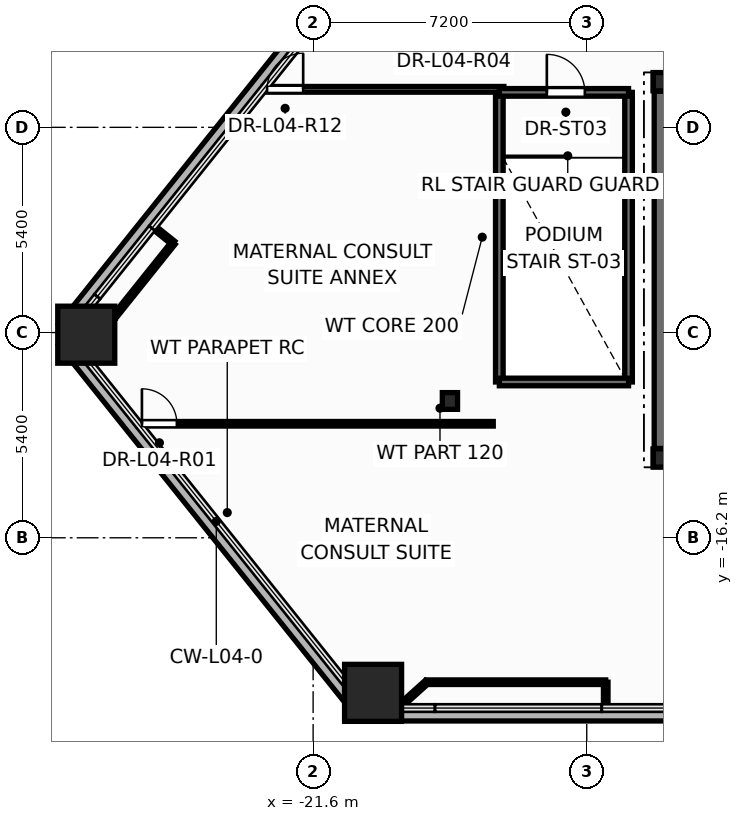
"""IFC4 building model, lengths in metres.
Left out: names, types, materials, properties, quantities, classifications, styles, units other than length and angle.
Written with IfcOpenShell. Run it as: python <this file> out.ifc"""

import sys

from ifc_helpers import new_model, si_unit, direction, frame, frame_2d, origin, origin_2d, place, context, subcontext, project, spatial, rectangle, hollow_rectangle, i_section, extrude, element, fill, save


model = new_model("IFC4")
c1 = context("Model", 3, precision=1e-05, world=origin(), true_north=direction((0.0, 1.0)))
c2 = subcontext(c1, "Body", "Model", "MODEL_VIEW")
j1 = project(units=[si_unit("LENGTHUNIT", "METRE"), si_unit("PLANEANGLEUNIT", "RADIAN")], contexts=[c1])
p1 = place(None, origin())
s1 = spatial("IfcSite", under=j1, at=p1, CompositionType="ELEMENT")
p2 = place(p1, origin())
s2 = spatial("IfcBuilding", under=s1, at=p2, CompositionType="ELEMENT")
p3 = place(p2, frame((0.0, 0.0, 18.9)))
s3 = spatial("IfcBuildingStorey", under=s2, at=p3, CompositionType="ELEMENT", Elevation=18.9)
for number, where, z_axis, x_axis in (
    (1, (-27.57, -10.856, 0.0), (0.0, 0.0, 1.0), (1.0, 0.0, 0.0)),
    (2, (-20.022, -20.28, 0.0), (0.0, 0.0, 1.0), (1.0, 0.0, 0.0)),
):
    element("IfcColumn", number, at=place(p3, frame(where, z_axis=z_axis, x_axis=x_axis)), inside=s3, PredefinedType="COLUMN", context=c2, shape_type="SweptSolid", body=[
        extrude(hollow_rectangle(XDim=1.5, YDim=1.5, WallThickness=0.075, at=origin_2d()), origin(), (0.0, 0.0, 1.0), 5.4),
    ])
for number, where, z_axis, x_axis in (
    (3, (-12.4, -14.1, 0.0), (0.0, 0.0, 1.0), (1.0, 0.0, 0.0)),
    (4, (-12.4, -4.2, 0.0), (0.0, 0.0, 1.0), (1.0, 0.0, 0.0)),
):
    element("IfcColumn", number, at=place(p3, frame(where, z_axis=z_axis, x_axis=x_axis)), inside=s3, PredefinedType="COLUMN", context=c2, shape_type="SweptSolid", body=[
        extrude(i_section(OverallWidth=0.5, OverallDepth=0.482, WebThickness=0.04, FlangeThickness=0.045, at=origin_2d()), origin(), (0.0, 0.0, 1.0), 5.4),
    ])
p4 = place(p3, frame((-18.0, -12.6, 0.0), z_axis=(0.0, 0.0, 1.0), x_axis=(1.0, 0.0, 0.0)))
e5 = element("IfcColumn", 5, at=p4, inside=s3, PredefinedType="COLUMN", context=c2, shape_type="SweptSolid", body=[
    extrude(i_section(OverallWidth=0.4, OverallDepth=0.44, WebThickness=0.028, FlangeThickness=0.04, at=origin_2d()), origin(), (0.0, 0.0, 1.0), 5.4),
])
p5 = place(p3, frame((-28.157, -11.019, -0.2), z_axis=(0.0, 0.0, 1.0), x_axis=(0.625119050196, -0.78052941846, 0.0)))
e6 = element("IfcWall", 6, at=p5, inside=s3, PredefinedType="PARAPET", context=c2, shape_type="SweptSolid", body=[
    extrude(rectangle(XDim=12.426, YDim=0.36, at=frame_2d((6.213, 0.0))), origin(), (0.0, 0.0, 1.0), 0.38),
])
p6 = place(p3, frame((-20.135, -20.84, -0.2), z_axis=(0.0, 0.0, 1.0), x_axis=(1.0, 0.0, 0.0)))
e7 = element("IfcWall", 7, at=p6, inside=s3, PredefinedType="PARAPET", context=c2, shape_type="SweptSolid", body=[
    extrude(rectangle(XDim=40.269, YDim=0.36, at=frame_2d((20.135, 0.0))), origin(), (0.0, 0.0, 1.0), 0.38),
])
p7 = place(p3, frame((-8.081, 14.374, -0.2), z_axis=(0.0, 0.0, 1.0), x_axis=(-0.625116772483, -0.780531242655, 0.0)))
e8 = element("IfcWall", 8, at=p7, inside=s3, PredefinedType="PARAPET", context=c2, shape_type="SweptSolid", body=[
    extrude(rectangle(XDim=32.115, YDim=0.36, at=frame_2d((16.058, 0.0))), origin(), (0.0, 0.0, 1.0), 0.38),
])
p8 = place(p3, frame((-12.65, -14.1, 0.0), z_axis=(0.0, 0.0, 1.0), x_axis=(1.0, 0.0, 0.0)))
e9 = element("IfcWall", 9, at=p8, inside=s3, PredefinedType="SHEAR", context=c2, shape_type="SweptSolid", body=[
    extrude(rectangle(XDim=25.3, YDim=0.45, at=frame_2d((12.65, 0.0))), origin(), (0.0, 0.0, 1.0), 5.4),
])
p9 = place(p3, frame((-12.65, -4.2, 0.0), z_axis=(0.0, 0.0, 1.0), x_axis=(1.0, 0.0, 0.0)))
e10 = element("IfcWall", 10, at=p9, inside=s3, PredefinedType="SHEAR", context=c2, shape_type="SweptSolid", body=[
    extrude(rectangle(XDim=25.3, YDim=0.45, at=frame_2d((12.65, 0.0))), origin(), (0.0, 0.0, 1.0), 5.4),
])
p10 = place(p9, frame((1.85, 0.0, 0.0)))
e11 = element("IfcOpeningElement", 11, at=p10, cuts=e10, PredefinedType="OPENING", context=c2, shape_type="SweptSolid", body=[
    extrude(rectangle(XDim=0.756, YDim=2.054, at=frame_2d((0.375, 1.027))), frame((0.0, 0.235, 0.0), z_axis=(0.0, -1.0, 0.0), x_axis=(1.0, 0.0, 0.0)), (0.0, 0.0, 1.0), 0.47),
])
p11 = place(p9, frame((21.85, 0.0, 0.0)))
e12 = element("IfcOpeningElement", 12, at=p11, cuts=e10, PredefinedType="OPENING", context=c2, shape_type="SweptSolid", body=[
    extrude(rectangle(XDim=0.756, YDim=2.054, at=frame_2d((0.375, 1.027))), frame((0.0, 0.235, 0.0), z_axis=(0.0, -1.0, 0.0), x_axis=(1.0, 0.0, 0.0)), (0.0, 0.0, 1.0), 0.47),
])
p12 = place(p9, frame((23.5, 0.0, 0.0)))
e13 = element("IfcOpeningElement", 13, at=p12, cuts=e10, PredefinedType="OPENING", context=c2, shape_type="SweptSolid", body=[
    extrude(rectangle(XDim=0.756, YDim=2.054, at=frame_2d((0.375, 1.027))), frame((0.0, 0.235, 0.0), z_axis=(0.0, -1.0, 0.0), x_axis=(1.0, 0.0, 0.0)), (0.0, 0.0, 1.0), 0.47),
])
p13 = place(p9, frame((5.85, 0.0, 0.0)))
e14 = element("IfcOpeningElement", 14, at=p13, cuts=e10, PredefinedType="OPENING", context=c2, shape_type="SweptSolid", body=[
    extrude(rectangle(XDim=1.006, YDim=2.104, at=frame_2d((0.5, 1.052))), frame((0.0, 0.235, 0.0), z_axis=(0.0, -1.0, 0.0), x_axis=(1.0, 0.0, 0.0)), (0.0, 0.0, 1.0), 0.47),
])
p14 = place(p9, frame((10.35, 0.0, 0.0)))
e15 = element("IfcOpeningElement", 15, at=p14, cuts=e10, PredefinedType="OPENING", context=c2, shape_type="SweptSolid", body=[
    extrude(rectangle(XDim=1.406, YDim=2.154, at=frame_2d((0.7, 1.077))), frame((0.0, 0.235, 0.0), z_axis=(0.0, -1.0, 0.0), x_axis=(1.0, 0.0, 0.0)), (0.0, 0.0, 1.0), 0.47),
])
p15 = place(p9, frame((18.45, 0.0, 0.0)))
e16 = element("IfcOpeningElement", 16, at=p15, cuts=e10, PredefinedType="OPENING", context=c2, shape_type="SweptSolid", body=[
    extrude(rectangle(XDim=1.006, YDim=2.104, at=frame_2d((0.5, 1.052))), frame((0.0, 0.235, 0.0), z_axis=(0.0, -1.0, 0.0), x_axis=(1.0, 0.0, 0.0)), (0.0, 0.0, 1.0), 0.47),
])
p16 = place(p3, frame((-12.4, -13.85, 0.0), z_axis=(0.0, 0.0, 1.0), x_axis=(0.0, 1.0, 0.0)))
e17 = element("IfcWall", 17, at=p16, inside=s3, PredefinedType="SHEAR", context=c2, shape_type="SweptSolid", body=[
    extrude(rectangle(XDim=9.4, YDim=0.45, at=frame_2d((4.7, 0.0))), origin(), (0.0, 0.0, 1.0), 5.4),
])
p17 = place(p3, frame((-26.205, -13.2, 0.0), z_axis=(0.0, 0.0, 1.0), x_axis=(1.0, 0.0, 0.0)))
e18 = element("IfcWall", 18, at=p17, inside=s3, PredefinedType="PARTITIONING", context=c2, shape_type="SweptSolid", body=[
    extrude(rectangle(XDim=9.345, YDim=0.12, at=frame_2d((4.672, 0.0))), origin(), (0.0, 0.0, 1.0), 4.125),
])
p18 = place(p17, frame((0.1, 0.0, 0.0)))
e19 = element("IfcOpeningElement", 19, at=p18, cuts=e18, PredefinedType="OPENING", context=c2, shape_type="SweptSolid", body=[
    extrude(rectangle(XDim=0.926, YDim=2.104, at=frame_2d((0.46, 1.052))), frame((0.0, 0.07, 0.0), z_axis=(0.0, -1.0, 0.0), x_axis=(1.0, 0.0, 0.0)), (0.0, 0.0, 1.0), 0.14),
])
for number, where, z_axis, x_axis in (
    (20, (-16.7, -12.1, 0.0), (0.0, 0.0, 1.0), (0.0, 1.0, 0.0)),
    (21, (-13.3, -12.1, 0.0), (0.0, 0.0, 1.0), (0.0, 1.0, 0.0)),
):
    element("IfcWall", number, at=place(p3, frame(where, z_axis=z_axis, x_axis=x_axis)), inside=s3, PredefinedType="SOLIDWALL", context=c2, shape_type="SweptSolid", body=[
        extrude(rectangle(XDim=7.62, YDim=0.2, at=frame_2d((3.81, 0.0))), origin(), (0.0, 0.0, 1.0), 5.4),
    ])
p19 = place(p3, frame((-22.912, -4.4, 0.0), z_axis=(0.0, 0.0, 1.0), x_axis=(1.0, 0.0, 0.0)))
e22 = element("IfcWall", 22, at=p19, inside=s3, PredefinedType="PARTITIONING", context=c2, shape_type="SweptSolid", body=[
    extrude(rectangle(XDim=6.332, YDim=0.15, at=frame_2d((3.166, 0.0))), origin(), (0.0, 0.0, 1.0), 4.125),
])
p20 = place(p19, frame((0.1, 0.0, 0.0)))
e23 = element("IfcOpeningElement", 23, at=p20, cuts=e22, PredefinedType="OPENING", context=c2, shape_type="SweptSolid", body=[
    extrude(rectangle(XDim=0.956, YDim=2.104, at=frame_2d((0.475, 1.052))), frame((0.0, 0.085, 0.0), z_axis=(0.0, -1.0, 0.0), x_axis=(1.0, 0.0, 0.0)), (0.0, 0.0, 1.0), 0.17),
])
p21 = place(p3, frame((-18.614, -20.0, 0.0), z_axis=(0.0, 0.0, 1.0), x_axis=(1.0, 0.0, 0.0)))
e24 = element("IfcWall", 24, at=p21, inside=s3, PredefinedType="PARTITIONING", context=c2, shape_type="SweptSolid", body=[
    extrude(rectangle(XDim=4.713, YDim=0.12, at=frame_2d((2.357, 0.0))), origin(), (0.0, 0.0, 1.0), 3.675),
])
p22 = place(p3, frame((-16.7, -12.1, 0.0), z_axis=(0.0, 0.0, 1.0), x_axis=(1.0, 0.0, 0.0)))
e25 = element("IfcWall", 25, at=p22, inside=s3, PredefinedType="SOLIDWALL", context=c2, shape_type="SweptSolid", body=[
    extrude(rectangle(XDim=3.4, YDim=0.2, at=frame_2d((1.7, 0.0))), origin(), (0.0, 0.0, 1.0), 5.4),
])
p23 = place(p3, frame((-16.7, -4.48, 0.0), z_axis=(0.0, 0.0, 1.0), x_axis=(1.0, 0.0, 0.0)))
e26 = element("IfcWall", 26, at=p23, inside=s3, PredefinedType="SOLIDWALL", context=c2, shape_type="SweptSolid", body=[
    extrude(rectangle(XDim=3.4, YDim=0.2, at=frame_2d((1.7, 0.0))), origin(), (0.0, 0.0, 1.0), 5.4),
])
p24 = place(p23, frame((1.25, 0.0, 0.0)))
e27 = element("IfcOpeningElement", 27, at=p24, cuts=e26, PredefinedType="OPENING", context=c2, shape_type="SweptSolid", body=[
    extrude(rectangle(XDim=1.006, YDim=2.104, at=frame_2d((0.5, 1.052))), frame((0.0, 0.11, 0.0), z_axis=(0.0, -1.0, 0.0), x_axis=(1.0, 0.0, 0.0)), (0.0, 0.0, 1.0), 0.22),
])
p25 = place(p3, frame((-25.278, -8.442, 0.0), z_axis=(0.0, 0.0, 1.0), x_axis=(-0.624996071722, -0.780627894923, 0.0)))
e28 = element("IfcWall", 28, at=p25, inside=s3, PredefinedType="PARTITIONING", context=c2, shape_type="SweptSolid", body=[
    extrude(rectangle(XDim=2.472, YDim=0.12, at=frame_2d((1.236, 0.0))), origin(), (0.0, 0.0, 1.0), 3.675),
])
p26 = place(p3, frame((-26.823, -10.372, 0.0), z_axis=(0.0, 0.0, 1.0), x_axis=(-0.983342785939, -0.181760736526, 0.0)))
e29 = element("IfcWall", 29, at=p26, inside=s3, PredefinedType="PARTITIONING", context=c2, shape_type="SweptSolid", body=[
    extrude(rectangle(XDim=0.852, YDim=0.12, at=frame_2d((0.426, 0.0))), origin(), (0.0, 0.0, 1.0), 3.675),
])
p27 = place(p3, frame((-19.246, -20.569, 0.0), z_axis=(0.0, 0.0, 1.0), x_axis=(0.74327988183, 0.668980580635, 0.0)))
e30 = element("IfcWall", 30, at=p27, inside=s3, PredefinedType="PARTITIONING", context=c2, shape_type="SweptSolid", body=[
    extrude(rectangle(XDim=0.851, YDim=0.12, at=frame_2d((0.426, 0.0))), origin(), (0.0, 0.0, 1.0), 3.675),
])
p28 = place(p3, frame((-13.9, -20.0, 0.0), z_axis=(0.0, 0.0, 1.0), x_axis=(0.0, -1.0, 0.0)))
e31 = element("IfcWall", 31, at=p28, inside=s3, PredefinedType="PARTITIONING", context=c2, shape_type="SweptSolid", body=[
    extrude(rectangle(XDim=0.67, YDim=0.12, at=frame_2d((0.335, 0.0))), origin(), (0.0, 0.0, 1.0), 4.513),
])
p29 = place(p3, frame((-25.801, -8.024, 0.0), z_axis=(0.0, 0.0, 1.0), x_axis=(0.780477444014, -0.625183940441, 0.0)))
e32 = element("IfcWall", 32, at=p29, inside=s3, PredefinedType="PARTITIONING", context=c2, shape_type="SweptSolid", body=[
    extrude(rectangle(XDim=0.67, YDim=0.12, at=frame_2d((0.335, 0.0))), origin(), (0.0, 0.0, 1.0), 4.513),
])
p30 = place(p24, origin())
e33 = element("IfcDoor", 33, at=p30, inside=s3, OperationType="SINGLE_SWING_LEFT", PredefinedType="DOOR", context=c2, shape_type="SweptSolid", body=[
    extrude(rectangle(XDim=1.0, YDim=2.1, at=frame_2d((0.5, 1.05))), frame((0.0, 0.025, 0.0), z_axis=(0.0, -1.0, 0.0), x_axis=(1.0, 0.0, 0.0)), (0.0, 0.0, 1.0), 0.05),
])
fill(e27, e33)
p31 = place(p18, origin())
e34 = element("IfcDoor", 34, at=p31, inside=s3, OperationType="SINGLE_SWING_LEFT", PredefinedType="DOOR", context=c2, shape_type="SweptSolid", body=[
    extrude(rectangle(XDim=0.92, YDim=2.1, at=frame_2d((0.46, 1.05))), frame((0.0, 0.025, 0.0), z_axis=(0.0, -1.0, 0.0), x_axis=(1.0, 0.0, 0.0)), (0.0, 0.0, 1.0), 0.05),
])
fill(e19, e34)
p32 = place(p20, origin())
e35 = element("IfcDoor", 35, at=p32, inside=s3, OperationType="SINGLE_SWING_RIGHT", PredefinedType="DOOR", context=c2, shape_type="SweptSolid", body=[
    extrude(rectangle(XDim=0.95, YDim=2.1, at=frame_2d((0.475, 1.05))), frame((0.0, 0.025, 0.0), z_axis=(0.0, -1.0, 0.0), x_axis=(1.0, 0.0, 0.0)), (0.0, 0.0, 1.0), 0.05),
])
fill(e23, e35)
save(model, sys.argv[1])
